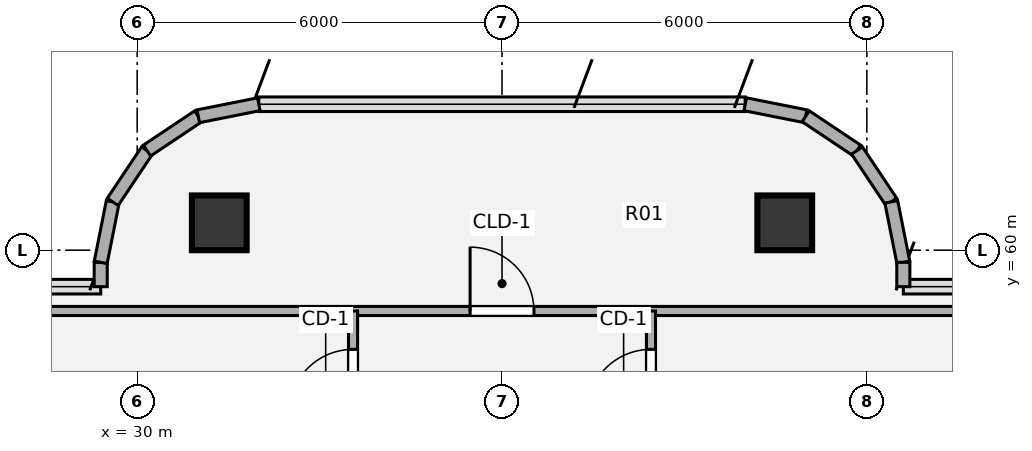
"""IFC4 building model, lengths in metres.
Left out: names, types, materials, properties, quantities, classifications, styles, units other than length and angle.
Written with IfcOpenShell. Run it as: python <this file> out.ifc"""

import sys

from ifc_helpers import new_model, si_unit, direction, frame, frame_2d, origin, origin_2d, place, context, subcontext, project, spatial, rectangle, hollow_circle, extrude, source, transform, mapped, element, fill, save


model = new_model("IFC4")
c1 = context("Model", 3, precision=1e-05, world=origin(), true_north=direction((0.0, 1.0)))
c2 = subcontext(c1, "Body", "Model", "MODEL_VIEW")
j1 = project(units=[si_unit("LENGTHUNIT", "METRE"), si_unit("PLANEANGLEUNIT", "RADIAN")], contexts=[c1])
p1 = place(None, origin())
s1 = spatial("IfcSite", under=j1, at=p1, CompositionType="ELEMENT")
p2 = place(p1, origin())
s2 = spatial("IfcBuilding", under=s1, at=p2, CompositionType="ELEMENT")
p3 = place(p2, frame((0.0, 0.0, 268.38)))
s3 = spatial("IfcBuildingStorey", under=s2, at=p3, CompositionType="ELEMENT", Elevation=268.38)
m1 = source(origin(), c2, "Body", "SweptSolid", [
    extrude(hollow_circle(Radius=0.45, WallThickness=0.032, at=origin_2d()), origin(), (0.0, 0.0, 1.0), 3.78),
])
for number, where, z_axis, x_axis in (
    (1, (31.35, 60.45, 0.0), (0.0, 0.0, 1.0), (1.0, 0.0, 0.0)),
    (2, (40.65, 60.45, 0.0), (0.0, 0.0, 1.0), (1.0, 0.0, 0.0)),
):
    element("IfcColumn", number, at=place(p3, frame(where, z_axis=z_axis, x_axis=x_axis)), inside=s3, PredefinedType="COLUMN", context=c2, shape_type="MappedRepresentation", body=[
        mapped(m1, transform((0.0, 0.0, 0.0), x_axis=(1.0, 0.0, 0.0), y_axis=(0.0, 1.0, 0.0), z_axis=(0.0, 0.0, 1.0), scale=1.0)),
    ])
p4 = place(p3, frame((29.4, 59.4, 0.0), z_axis=(0.0, 0.0, 1.0), x_axis=(0.0, 1.0, 0.0)))
e3 = element("IfcWall", 3, at=p4, inside=s3, PredefinedType="SOLIDWALL", context=c2, shape_type="SweptSolid", body=[
    extrude(rectangle(XDim=0.4, YDim=0.215, at=frame_2d((0.2, 0.0))), origin(), (0.0, 0.0, 1.0), 3.53),
])
p5 = place(p3, frame((29.4, 59.8, 0.0), z_axis=(0.0, 0.0, 1.0), x_axis=(0.195190360752, 0.980765376158, 0.0)))
e4 = element("IfcWall", 4, at=p5, inside=s3, PredefinedType="SOLIDWALL", context=c2, shape_type="SweptSolid", body=[
    extrude(rectangle(XDim=1.014, YDim=0.215, at=frame_2d((0.507, 0.0))), origin(), (0.0, 0.0, 1.0), 3.53),
])
p6 = place(p3, frame((29.598, 60.795, 0.0), z_axis=(0.0, 0.0, 1.0), x_axis=(0.555643898837, 0.831420385657, 0.0)))
e5 = element("IfcWall", 5, at=p6, inside=s3, PredefinedType="SOLIDWALL", context=c2, shape_type="SweptSolid", body=[
    extrude(rectangle(XDim=1.015, YDim=0.215, at=frame_2d((0.507, 0.0))), origin(), (0.0, 0.0, 1.0), 3.53),
])
p7 = place(p3, frame((30.162, 61.638, 0.0), z_axis=(0.0, 0.0, 1.0), x_axis=(0.831346067305, 0.555755086685, 0.0)))
e6 = element("IfcWall", 6, at=p7, inside=s3, PredefinedType="SOLIDWALL", context=c2, shape_type="SweptSolid", body=[
    extrude(rectangle(XDim=1.014, YDim=0.215, at=frame_2d((0.507, 0.0))), origin(), (0.0, 0.0, 1.0), 3.53),
])
for number, where, z_axis, x_axis in (
    (7, (31.005, 62.202, 0.0), (0.0, 0.0, 1.0), (0.981, 0.195, 0.0)),
    (8, (40.0, 62.4, 0.0), (0.0, 0.0, 1.0), (0.981, -0.195, 0.0)),
):
    element("IfcWall", number, at=place(p3, frame(where, z_axis=z_axis, x_axis=x_axis)), inside=s3, PredefinedType="SOLIDWALL", context=c2, shape_type="SweptSolid", body=[
        extrude(rectangle(XDim=1.015, YDim=0.215, at=frame_2d((0.507, 0.0))), origin(), (0.0, 0.0, 1.0), 3.53),
    ])
p8 = place(p3, frame((40.995, 62.202, 0.0), z_axis=(0.0, 0.0, 1.0), x_axis=(0.831346067305, -0.555755086685, 0.0)))
e9 = element("IfcWall", 9, at=p8, inside=s3, PredefinedType="SOLIDWALL", context=c2, shape_type="SweptSolid", body=[
    extrude(rectangle(XDim=1.014, YDim=0.215, at=frame_2d((0.507, 0.0))), origin(), (0.0, 0.0, 1.0), 3.53),
])
p9 = place(p3, frame((41.838, 61.638, 0.0), z_axis=(0.0, 0.0, 1.0), x_axis=(0.555643898837, -0.831420385657, 0.0)))
e10 = element("IfcWall", 10, at=p9, inside=s3, PredefinedType="SOLIDWALL", context=c2, shape_type="SweptSolid", body=[
    extrude(rectangle(XDim=1.015, YDim=0.215, at=frame_2d((0.507, 0.0))), origin(), (0.0, 0.0, 1.0), 3.53),
])
p10 = place(p3, frame((42.402, 60.795, 0.0), z_axis=(0.0, 0.0, 1.0), x_axis=(0.195190360752, -0.980765376158, 0.0)))
e11 = element("IfcWall", 11, at=p10, inside=s3, PredefinedType="SOLIDWALL", context=c2, shape_type="SweptSolid", body=[
    extrude(rectangle(XDim=1.014, YDim=0.215, at=frame_2d((0.507, 0.0))), origin(), (0.0, 0.0, 1.0), 3.53),
])
p11 = place(p3, frame((42.6, 59.8, 0.0), z_axis=(0.0, 0.0, 1.0), x_axis=(0.0, -1.0, 0.0)))
e12 = element("IfcWall", 12, at=p11, inside=s3, PredefinedType="SOLIDWALL", context=c2, shape_type="SweptSolid", body=[
    extrude(rectangle(XDim=0.4, YDim=0.215, at=frame_2d((0.2, 0.0))), origin(), (0.0, 0.0, 1.0), 3.53),
])
p12 = place(p3, frame((27.1, 59.0, 0.0), z_axis=(0.0, 0.0, 1.0), x_axis=(1.0, 0.0, 0.0)))
e13 = element("IfcWall", 13, at=p12, inside=s3, PredefinedType="PARTITIONING", context=c2, shape_type="SweptSolid", body=[
    extrude(rectangle(XDim=17.8, YDim=0.15, at=frame_2d((8.9, 0.0))), origin(), (0.0, 0.0, 1.0), 3.308),
])
p13 = place(p12, frame((8.375, 0.0, 0.0)))
e14 = element("IfcOpeningElement", 14, at=p13, cuts=e13, PredefinedType="OPENING", context=c2, shape_type="SweptSolid", body=[
    extrude(rectangle(XDim=1.05, YDim=2.1, at=origin_2d()), frame((0.525, 0.085, 1.05), z_axis=(0.0, -1.0, 0.0), x_axis=(1.0, 0.0, 0.0)), (0.0, 0.0, 1.0), 0.17),
])
p14 = place(p3, frame((33.55, 56.679, 0.0), z_axis=(0.0, 0.0, 1.0), x_axis=(0.0, 1.0, 0.0)))
e15 = element("IfcWall", 15, at=p14, inside=s3, PredefinedType="PARTITIONING", context=c2, shape_type="SweptSolid", body=[
    extrude(rectangle(XDim=2.321, YDim=0.15, at=frame_2d((1.161, 0.0))), origin(), (0.0, 0.0, 1.0), 3.5),
])
p15 = place(p14, frame((0.64, 0.0, 0.0)))
e16 = element("IfcOpeningElement", 16, at=p15, cuts=e15, PredefinedType="OPENING", context=c2, shape_type="SweptSolid", body=[
    extrude(rectangle(XDim=1.05, YDim=2.1, at=origin_2d()), frame((0.525, 0.085, 1.05), z_axis=(0.0, -1.0, 0.0), x_axis=(1.0, 0.0, 0.0)), (0.0, 0.0, 1.0), 0.17),
])
p16 = place(p3, frame((38.45, 56.679, 0.0), z_axis=(0.0, 0.0, 1.0), x_axis=(0.0, 1.0, 0.0)))
e17 = element("IfcWall", 17, at=p16, inside=s3, PredefinedType="PARTITIONING", context=c2, shape_type="SweptSolid", body=[
    extrude(rectangle(XDim=2.321, YDim=0.15, at=frame_2d((1.161, 0.0))), origin(), (0.0, 0.0, 1.0), 3.5),
])
p17 = place(p16, frame((0.64, 0.0, 0.0)))
e18 = element("IfcOpeningElement", 18, at=p17, cuts=e17, PredefinedType="OPENING", context=c2, shape_type="SweptSolid", body=[
    extrude(rectangle(XDim=1.05, YDim=2.1, at=origin_2d()), frame((0.525, 0.085, 1.05), z_axis=(0.0, -1.0, 0.0), x_axis=(1.0, 0.0, 0.0)), (0.0, 0.0, 1.0), 0.17),
])
m2 = source(origin(), c2, "Body", "SweptSolid", [
    extrude(rectangle(XDim=1.05, YDim=2.1, at=origin_2d()), frame((0.525, 0.025, 1.05), z_axis=(0.0, -1.0, 0.0), x_axis=(1.0, 0.0, 0.0)), (0.0, 0.0, 1.0), 0.05),
])
p18 = place(p13, origin())
e19 = element("IfcDoor", 19, at=p18, inside=s3, OperationType="SINGLE_SWING_LEFT", PredefinedType="DOOR", context=c2, shape_type="MappedRepresentation", body=[
    mapped(m2, transform((0.0, 0.0, 0.0), x_axis=(1.0, 0.0, 0.0), y_axis=(0.0, 1.0, 0.0), z_axis=(0.0, 0.0, 1.0), scale=1.0)),
])
fill(e14, e19)
m3 = source(origin(), c2, "Body", "SweptSolid", [
    extrude(rectangle(XDim=1.05, YDim=2.1, at=origin_2d()), frame((0.525, 0.025, 1.05), z_axis=(0.0, -1.0, 0.0), x_axis=(1.0, 0.0, 0.0)), (0.0, 0.0, 1.0), 0.05),
])
p19 = place(p15, origin())
e20 = element("IfcDoor", 20, at=p19, inside=s3, OperationType="SINGLE_SWING_LEFT", PredefinedType="DOOR", context=c2, shape_type="MappedRepresentation", body=[
    mapped(m3, transform((0.0, 0.0, 0.0), x_axis=(1.0, 0.0, 0.0), y_axis=(0.0, 1.0, 0.0), z_axis=(0.0, 0.0, 1.0), scale=1.0)),
])
fill(e16, e20)
p20 = place(p17, origin())
e21 = element("IfcDoor", 21, at=p20, inside=s3, OperationType="SINGLE_SWING_LEFT", PredefinedType="DOOR", context=c2, shape_type="MappedRepresentation", body=[
    mapped(m3, transform((0.0, 0.0, 0.0), x_axis=(1.0, 0.0, 0.0), y_axis=(0.0, 1.0, 0.0), z_axis=(0.0, 0.0, 1.0), scale=1.0)),
])
fill(e18, e21)
save(model, sys.argv[1])
